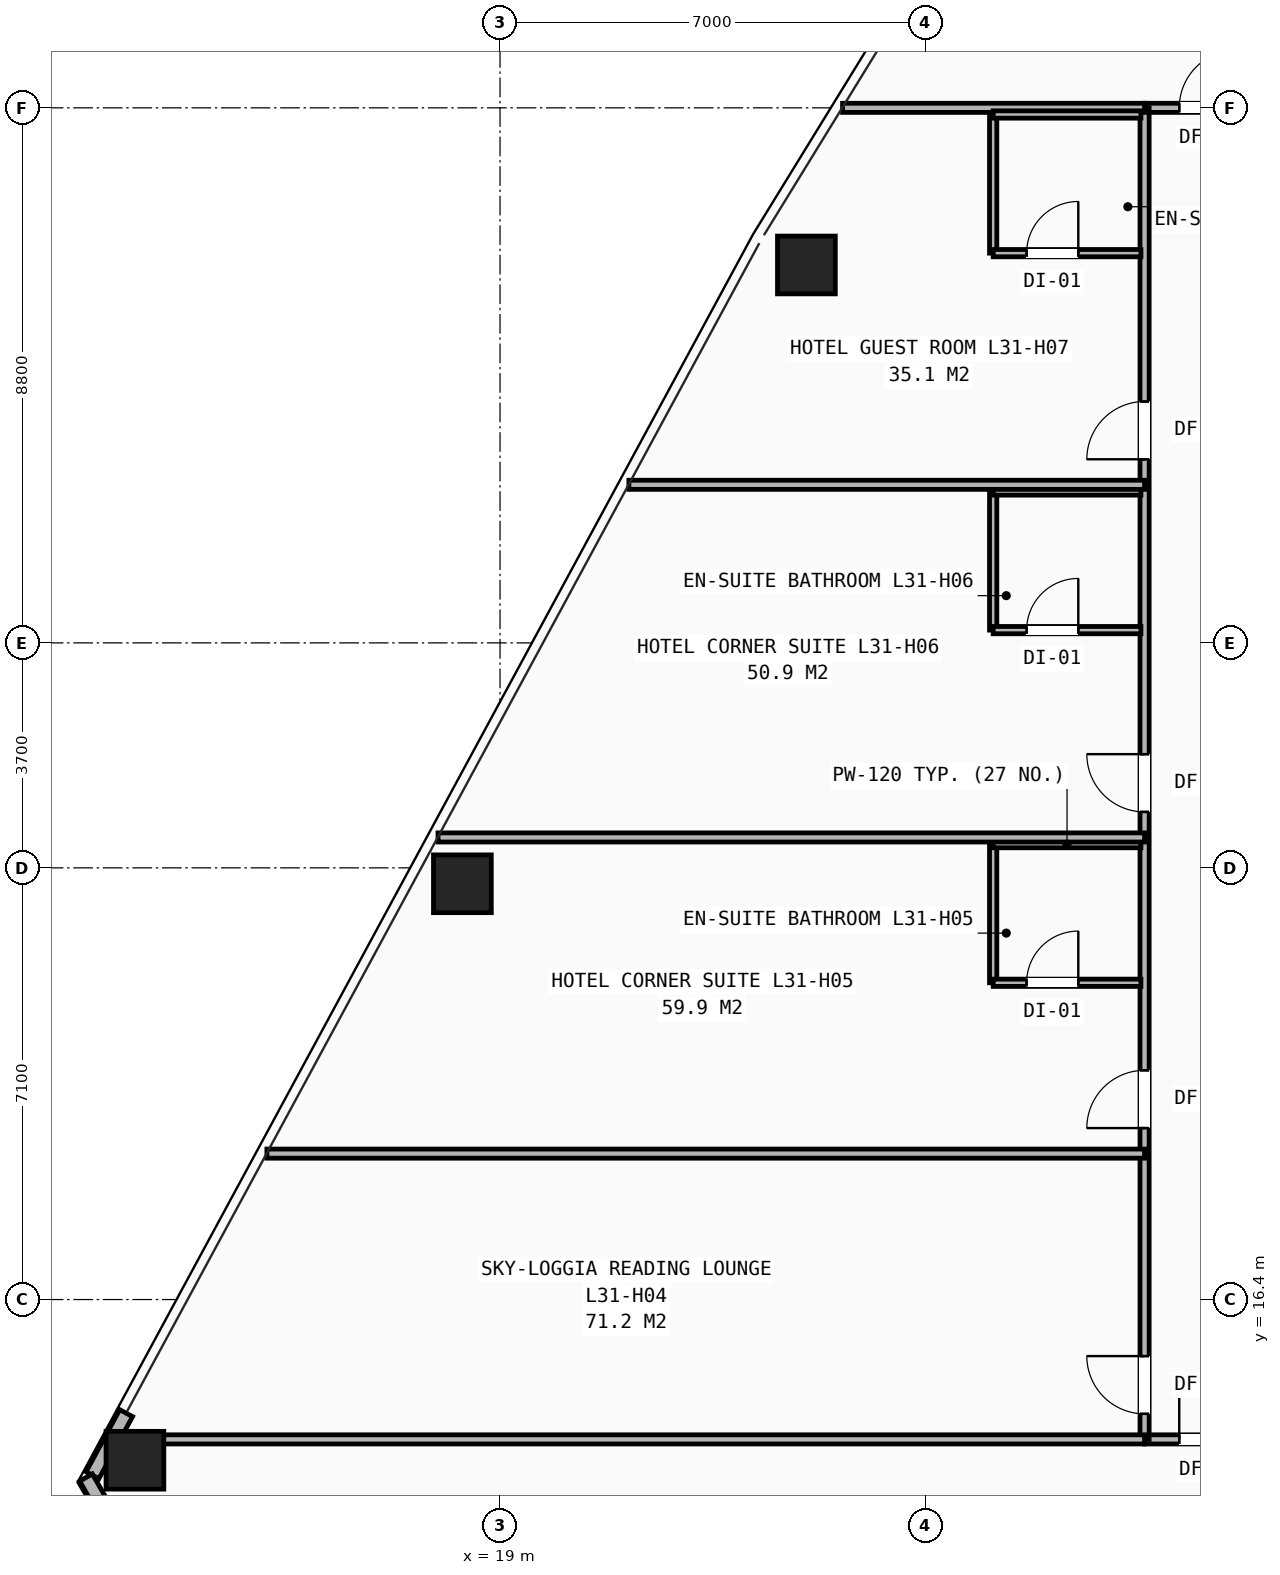
"""IFC4 building model, lengths in metres.
Left out: names, types, materials, properties, quantities, classifications, styles, units other than length and angle.
Written with IfcOpenShell. Run it as: python <this file> out.ifc"""

import sys

from ifc_helpers import new_model, si_unit, direction, frame, frame_2d, origin, origin_2d, place, context, subcontext, project, spatial, rectangle, hollow_rectangle, extrude, element, fill, save


model = new_model("IFC4")
c1 = context("Model", 3, precision=1e-05, world=origin(), true_north=direction((0.0, 1.0)))
c2 = subcontext(c1, "Body", "Model", "MODEL_VIEW")
j1 = project(units=[si_unit("LENGTHUNIT", "METRE"), si_unit("PLANEANGLEUNIT", "RADIAN")], contexts=[c1])
p1 = place(None, origin())
s1 = spatial("IfcSite", under=j1, at=p1, CompositionType="ELEMENT")
p2 = place(p1, origin())
s2 = spatial("IfcBuilding", under=s1, at=p2, CompositionType="ELEMENT")
p3 = place(p2, frame((0.0, 0.0, 108.6)))
s3 = spatial("IfcBuildingStorey", under=s2, at=p3, CompositionType="ELEMENT", Elevation=108.6)
for number, where, z_axis, x_axis in (
    (1, (24.038, 33.416, 0.0), (0.0, 0.0, 1.0), (1.0, 0.0, 0.0)),
    (2, (18.381, 23.238, 0.0), (0.0, 0.0, 1.0), (1.0, 0.0, 0.0)),
    (3, (12.996, 13.757, 0.0), (0.0, 0.0, 1.0), (1.0, 0.0, 0.0)),
):
    element("IfcColumn", number, at=place(p3, frame(where, z_axis=z_axis, x_axis=x_axis)), inside=s3, PredefinedType="COLUMN", context=c2, shape_type="SweptSolid", body=[
        extrude(hollow_rectangle(XDim=0.95, YDim=0.95, WallThickness=0.065, at=origin_2d()), origin(), (0.0, 0.0, 1.0), 3.2),
    ])
p4 = place(p3, frame((12.85, 14.532, 0.0), z_axis=(0.0, 0.0, 1.0), x_axis=(-0.475877177097, -0.879511746549, 0.0)))
e4 = element("IfcWall", 4, at=p4, inside=s3, PredefinedType="SHEAR", context=c2, shape_type="SweptSolid", body=[
    extrude(rectangle(XDim=1.163, YDim=0.24, at=frame_2d((0.581, 0.0))), origin(), (0.0, 0.0, 1.0), 2.223),
])
p5 = place(p3, frame((16.805, 5.48, 0.0), z_axis=(0.0, 0.0, 1.0), x_axis=(-0.500017094579, 0.866015534, 0.0)))
e5 = element("IfcWall", 5, at=p5, inside=s3, PredefinedType="SHEAR", context=c2, shape_type="SweptSolid", body=[
    extrude(rectangle(XDim=9.229, YDim=0.24, at=frame_2d((4.614, 0.0))), origin(), (0.0, 0.0, 1.0), 2.223),
])
p6 = place(p3, frame((29.6, 14.1, 0.0), z_axis=(0.0, 0.0, 1.0), x_axis=(1.0, 0.0, 0.0)))
e6 = element("IfcWall", 6, at=p6, inside=s3, PredefinedType="PARTITIONING", context=c2, shape_type="SweptSolid", body=[
    extrude(rectangle(XDim=20.8, YDim=0.15, at=frame_2d((10.4, 0.0))), origin(), (0.0, 0.0, 1.0), 2.151),
])
p7 = place(p6, frame((0.57, 0.0, 0.0)))
e7 = element("IfcOpeningElement", 7, at=p7, cuts=e6, PredefinedType="OPENING", context=c2, shape_type="SweptSolid", body=[
    extrude(rectangle(XDim=0.95, YDim=2.1, at=frame_2d((0.475, 1.05))), frame((0.0, 0.085, 0.0), z_axis=(0.0, -1.0, 0.0), x_axis=(1.0, 0.0, 0.0)), (0.0, 0.0, 1.0), 0.17),
])
p8 = place(p6, frame((13.02, 0.0, 0.0)))
e8 = element("IfcOpeningElement", 8, at=p8, cuts=e6, PredefinedType="OPENING", context=c2, shape_type="SweptSolid", body=[
    extrude(rectangle(XDim=0.95, YDim=2.1, at=frame_2d((0.475, 1.05))), frame((0.0, 0.085, 0.0), z_axis=(0.0, -1.0, 0.0), x_axis=(1.0, 0.0, 0.0)), (0.0, 0.0, 1.0), 0.17),
])
p9 = place(p6, frame((17.42, 0.0, 0.0)))
e9 = element("IfcOpeningElement", 9, at=p9, cuts=e6, PredefinedType="OPENING", context=c2, shape_type="SweptSolid", body=[
    extrude(rectangle(XDim=0.95, YDim=2.1, at=frame_2d((0.475, 1.05))), frame((0.0, 0.085, 0.0), z_axis=(0.0, -1.0, 0.0), x_axis=(1.0, 0.0, 0.0)), (0.0, 0.0, 1.0), 0.17),
])
p10 = place(p3, frame((29.6, 36.0, 0.0), z_axis=(0.0, 0.0, 1.0), x_axis=(1.0, 0.0, 0.0)))
e10 = element("IfcWall", 10, at=p10, inside=s3, PredefinedType="PARTITIONING", context=c2, shape_type="SweptSolid", body=[
    extrude(rectangle(XDim=9.65, YDim=0.15, at=frame_2d((4.825, 0.0))), origin(), (0.0, 0.0, 1.0), 2.473),
])
p11 = place(p10, frame((0.57, 0.0, 0.0)))
e11 = element("IfcOpeningElement", 11, at=p11, cuts=e10, PredefinedType="OPENING", context=c2, shape_type="SweptSolid", body=[
    extrude(rectangle(XDim=0.95, YDim=2.1, at=frame_2d((0.475, 1.05))), frame((0.0, 0.085, 0.0), z_axis=(0.0, -1.0, 0.0), x_axis=(1.0, 0.0, 0.0)), (0.0, 0.0, 1.0), 0.17),
])
p12 = place(p10, frame((7.32, 0.0, 0.0)))
e12 = element("IfcOpeningElement", 12, at=p12, cuts=e10, PredefinedType="OPENING", context=c2, shape_type="SweptSolid", body=[
    extrude(rectangle(XDim=0.95, YDim=2.1, at=frame_2d((0.475, 1.05))), frame((0.0, 0.085, 0.0), z_axis=(0.0, -1.0, 0.0), x_axis=(1.0, 0.0, 0.0)), (0.0, 0.0, 1.0), 0.17),
])
p13 = place(p3, frame((29.6, 14.1, 0.0), z_axis=(0.0, 0.0, 1.0), x_axis=(0.0, 1.0, 0.0)))
e13 = element("IfcWall", 13, at=p13, inside=s3, PredefinedType="PARTITIONING", context=c2, shape_type="SweptSolid", body=[
    extrude(rectangle(XDim=21.9, YDim=0.15, at=frame_2d((10.95, 0.0))), origin(), (0.0, 0.0, 1.0), 2.151),
])
p14 = place(p13, frame((0.42, 0.0, 0.0)))
e14 = element("IfcOpeningElement", 14, at=p14, cuts=e13, PredefinedType="OPENING", context=c2, shape_type="SweptSolid", body=[
    extrude(rectangle(XDim=0.95, YDim=2.1, at=frame_2d((0.475, 1.05))), frame((0.0, 0.085, 0.0), z_axis=(0.0, -1.0, 0.0), x_axis=(1.0, 0.0, 0.0)), (0.0, 0.0, 1.0), 0.17),
])
p15 = place(p13, frame((5.12, 0.0, 0.0)))
e15 = element("IfcOpeningElement", 15, at=p15, cuts=e13, PredefinedType="OPENING", context=c2, shape_type="SweptSolid", body=[
    extrude(rectangle(XDim=0.95, YDim=2.1, at=frame_2d((0.475, 1.05))), frame((0.0, 0.085, 0.0), z_axis=(0.0, -1.0, 0.0), x_axis=(1.0, 0.0, 0.0)), (0.0, 0.0, 1.0), 0.17),
])
p16 = place(p13, frame((10.32, 0.0, 0.0)))
e16 = element("IfcOpeningElement", 16, at=p16, cuts=e13, PredefinedType="OPENING", context=c2, shape_type="SweptSolid", body=[
    extrude(rectangle(XDim=0.95, YDim=2.1, at=frame_2d((0.475, 1.05))), frame((0.0, 0.085, 0.0), z_axis=(0.0, -1.0, 0.0), x_axis=(1.0, 0.0, 0.0)), (0.0, 0.0, 1.0), 0.17),
])
p17 = place(p13, frame((16.12, 0.0, 0.0)))
e17 = element("IfcOpeningElement", 17, at=p17, cuts=e13, PredefinedType="OPENING", context=c2, shape_type="SweptSolid", body=[
    extrude(rectangle(XDim=0.95, YDim=2.1, at=frame_2d((0.475, 1.05))), frame((0.0, 0.085, 0.0), z_axis=(0.0, -1.0, 0.0), x_axis=(1.0, 0.0, 0.0)), (0.0, 0.0, 1.0), 0.17),
])
p18 = place(p3, frame((12.622, 14.1, 0.0), z_axis=(0.0, 0.0, 1.0), x_axis=(1.0, 0.0, 0.0)))
e18 = element("IfcWall", 18, at=p18, inside=s3, PredefinedType="PARTITIONING", context=c2, shape_type="SweptSolid", body=[
    extrude(rectangle(XDim=16.978, YDim=0.15, at=frame_2d((8.489, 0.0))), origin(), (0.0, 0.0, 1.0), 2.151),
])
p19 = place(p3, frame((24.633, 36.0, 0.0), z_axis=(0.0, 0.0, 1.0), x_axis=(1.0, 0.0, 0.0)))
e19 = element("IfcWall", 19, at=p19, inside=s3, PredefinedType="PARTITIONING", context=c2, shape_type="SweptSolid", body=[
    extrude(rectangle(XDim=4.967, YDim=0.15, at=frame_2d((2.483, 0.0))), origin(), (0.0, 0.0, 1.0), 2.228),
])
p20 = place(p3, frame((15.166, 18.8, 0.0), z_axis=(0.0, 0.0, 1.0), x_axis=(1.0, 0.0, 0.0)))
e20 = element("IfcWall", 20, at=p20, inside=s3, PredefinedType="PARTITIONING", context=c2, shape_type="SweptSolid", body=[
    extrude(rectangle(XDim=14.434, YDim=0.15, at=frame_2d((7.217, 0.0))), origin(), (0.0, 0.0, 1.0), 2.228),
])
p21 = place(p3, frame((27.11, 21.61, 0.0), z_axis=(0.0, 0.0, 1.0), x_axis=(0.0, 1.0, 0.0)))
e21 = element("IfcWall", 21, at=p21, inside=s3, PredefinedType="PARTITIONING", context=c2, shape_type="SweptSolid", body=[
    extrude(rectangle(XDim=2.28, YDim=0.12, at=frame_2d((1.14, 0.0))), origin(), (0.0, 0.0, 1.0), 2.94),
])
p22 = place(p3, frame((27.11, 21.61, 0.0), z_axis=(0.0, 0.0, 1.0), x_axis=(1.0, 0.0, 0.0)))
e22 = element("IfcWall", 22, at=p22, inside=s3, PredefinedType="PARTITIONING", context=c2, shape_type="SweptSolid", body=[
    extrude(rectangle(XDim=2.43, YDim=0.12, at=frame_2d((1.215, 0.0))), origin(), (0.0, 0.0, 1.0), 2.94),
])
p23 = place(p22, frame((0.55, 0.0, 0.0)))
e23 = element("IfcOpeningElement", 23, at=p23, cuts=e22, PredefinedType="OPENING", context=c2, shape_type="SweptSolid", body=[
    extrude(rectangle(XDim=0.85, YDim=2.05, at=frame_2d((0.425, 1.025))), frame((0.0, 0.07, 0.0), z_axis=(0.0, -1.0, 0.0), x_axis=(1.0, 0.0, 0.0)), (0.0, 0.0, 1.0), 0.14),
])
p24 = place(p3, frame((27.11, 23.89, 0.0), z_axis=(0.0, 0.0, 1.0), x_axis=(1.0, 0.0, 0.0)))
e24 = element("IfcWall", 24, at=p24, inside=s3, PredefinedType="PARTITIONING", context=c2, shape_type="SweptSolid", body=[
    extrude(rectangle(XDim=2.43, YDim=0.12, at=frame_2d((1.215, 0.0))), origin(), (0.0, 0.0, 1.0), 2.94),
])
p25 = place(p3, frame((17.98, 24.0, 0.0), z_axis=(0.0, 0.0, 1.0), x_axis=(1.0, 0.0, 0.0)))
e25 = element("IfcWall", 25, at=p25, inside=s3, PredefinedType="PARTITIONING", context=c2, shape_type="SweptSolid", body=[
    extrude(rectangle(XDim=11.62, YDim=0.15, at=frame_2d((5.81, 0.0))), origin(), (0.0, 0.0, 1.0), 2.228),
])
p26 = place(p3, frame((27.11, 27.41, 0.0), z_axis=(0.0, 0.0, 1.0), x_axis=(0.0, 1.0, 0.0)))
e26 = element("IfcWall", 26, at=p26, inside=s3, PredefinedType="PARTITIONING", context=c2, shape_type="SweptSolid", body=[
    extrude(rectangle(XDim=2.28, YDim=0.12, at=frame_2d((1.14, 0.0))), origin(), (0.0, 0.0, 1.0), 2.94),
])
p27 = place(p3, frame((27.11, 27.41, 0.0), z_axis=(0.0, 0.0, 1.0), x_axis=(1.0, 0.0, 0.0)))
e27 = element("IfcWall", 27, at=p27, inside=s3, PredefinedType="PARTITIONING", context=c2, shape_type="SweptSolid", body=[
    extrude(rectangle(XDim=2.43, YDim=0.12, at=frame_2d((1.215, 0.0))), origin(), (0.0, 0.0, 1.0), 2.94),
])
p28 = place(p27, frame((0.55, 0.0, 0.0)))
e28 = element("IfcOpeningElement", 28, at=p28, cuts=e27, PredefinedType="OPENING", context=c2, shape_type="SweptSolid", body=[
    extrude(rectangle(XDim=0.85, YDim=2.05, at=frame_2d((0.425, 1.025))), frame((0.0, 0.07, 0.0), z_axis=(0.0, -1.0, 0.0), x_axis=(1.0, 0.0, 0.0)), (0.0, 0.0, 1.0), 0.14),
])
p29 = place(p3, frame((27.11, 29.69, 0.0), z_axis=(0.0, 0.0, 1.0), x_axis=(1.0, 0.0, 0.0)))
e29 = element("IfcWall", 29, at=p29, inside=s3, PredefinedType="PARTITIONING", context=c2, shape_type="SweptSolid", body=[
    extrude(rectangle(XDim=2.43, YDim=0.12, at=frame_2d((1.215, 0.0))), origin(), (0.0, 0.0, 1.0), 2.94),
])
p30 = place(p3, frame((21.119, 29.8, 0.0), z_axis=(0.0, 0.0, 1.0), x_axis=(1.0, 0.0, 0.0)))
e30 = element("IfcWall", 30, at=p30, inside=s3, PredefinedType="PARTITIONING", context=c2, shape_type="SweptSolid", body=[
    extrude(rectangle(XDim=8.481, YDim=0.15, at=frame_2d((4.241, 0.0))), origin(), (0.0, 0.0, 1.0), 2.228),
])
p31 = place(p3, frame((27.11, 33.61, 0.0), z_axis=(0.0, 0.0, 1.0), x_axis=(0.0, 1.0, 0.0)))
e31 = element("IfcWall", 31, at=p31, inside=s3, PredefinedType="PARTITIONING", context=c2, shape_type="SweptSolid", body=[
    extrude(rectangle(XDim=2.28, YDim=0.12, at=frame_2d((1.14, 0.0))), origin(), (0.0, 0.0, 1.0), 2.94),
])
p32 = place(p3, frame((27.11, 33.61, 0.0), z_axis=(0.0, 0.0, 1.0), x_axis=(1.0, 0.0, 0.0)))
e32 = element("IfcWall", 32, at=p32, inside=s3, PredefinedType="PARTITIONING", context=c2, shape_type="SweptSolid", body=[
    extrude(rectangle(XDim=2.43, YDim=0.12, at=frame_2d((1.215, 0.0))), origin(), (0.0, 0.0, 1.0), 2.473),
])
p33 = place(p32, frame((0.55, 0.0, 0.0)))
e33 = element("IfcOpeningElement", 33, at=p33, cuts=e32, PredefinedType="OPENING", context=c2, shape_type="SweptSolid", body=[
    extrude(rectangle(XDim=0.85, YDim=2.05, at=frame_2d((0.425, 1.025))), frame((0.0, 0.07, 0.0), z_axis=(0.0, -1.0, 0.0), x_axis=(1.0, 0.0, 0.0)), (0.0, 0.0, 1.0), 0.14),
])
p34 = place(p3, frame((27.11, 35.89, 0.0), z_axis=(0.0, 0.0, 1.0), x_axis=(1.0, 0.0, 0.0)))
e34 = element("IfcWall", 34, at=p34, inside=s3, PredefinedType="PARTITIONING", context=c2, shape_type="SweptSolid", body=[
    extrude(rectangle(XDim=2.43, YDim=0.12, at=frame_2d((1.215, 0.0))), origin(), (0.0, 0.0, 1.0), 2.473),
])
p35 = place(p7, origin())
e35 = element("IfcDoor", 35, at=p35, inside=s3, OperationType="SINGLE_SWING_LEFT", PredefinedType="DOOR", context=c2, shape_type="SweptSolid", body=[
    extrude(rectangle(XDim=0.95, YDim=2.1, at=frame_2d((0.475, 1.05))), frame((0.0, 0.025, 0.0), z_axis=(0.0, -1.0, 0.0), x_axis=(1.0, 0.0, 0.0)), (0.0, 0.0, 1.0), 0.05),
])
fill(e7, e35)
p36 = place(p14, origin())
e36 = element("IfcDoor", 36, at=p36, inside=s3, OperationType="SINGLE_SWING_RIGHT", PredefinedType="DOOR", context=c2, shape_type="SweptSolid", body=[
    extrude(rectangle(XDim=0.95, YDim=2.1, at=frame_2d((0.475, 1.05))), frame((0.0, 0.025, 0.0), z_axis=(0.0, -1.0, 0.0), x_axis=(1.0, 0.0, 0.0)), (0.0, 0.0, 1.0), 0.05),
])
fill(e14, e36)
p37 = place(p15, origin())
e37 = element("IfcDoor", 37, at=p37, inside=s3, OperationType="SINGLE_SWING_LEFT", PredefinedType="DOOR", context=c2, shape_type="SweptSolid", body=[
    extrude(rectangle(XDim=0.95, YDim=2.1, at=frame_2d((0.475, 1.05))), frame((0.0, 0.025, 0.0), z_axis=(0.0, -1.0, 0.0), x_axis=(1.0, 0.0, 0.0)), (0.0, 0.0, 1.0), 0.05),
])
fill(e15, e37)
p38 = place(p23, origin())
e38 = element("IfcDoor", 38, at=p38, inside=s3, OperationType="SINGLE_SWING_RIGHT", PredefinedType="DOOR", context=c2, shape_type="SweptSolid", body=[
    extrude(rectangle(XDim=0.85, YDim=2.05, at=frame_2d((0.425, 1.025))), frame((0.0, 0.025, 0.0), z_axis=(0.0, -1.0, 0.0), x_axis=(1.0, 0.0, 0.0)), (0.0, 0.0, 1.0), 0.05),
])
fill(e23, e38)
p39 = place(p16, origin())
e39 = element("IfcDoor", 39, at=p39, inside=s3, OperationType="SINGLE_SWING_RIGHT", PredefinedType="DOOR", context=c2, shape_type="SweptSolid", body=[
    extrude(rectangle(XDim=0.95, YDim=2.1, at=frame_2d((0.475, 1.05))), frame((0.0, 0.025, 0.0), z_axis=(0.0, -1.0, 0.0), x_axis=(1.0, 0.0, 0.0)), (0.0, 0.0, 1.0), 0.05),
])
fill(e16, e39)
p40 = place(p28, origin())
e40 = element("IfcDoor", 40, at=p40, inside=s3, OperationType="SINGLE_SWING_RIGHT", PredefinedType="DOOR", context=c2, shape_type="SweptSolid", body=[
    extrude(rectangle(XDim=0.85, YDim=2.05, at=frame_2d((0.425, 1.025))), frame((0.0, 0.025, 0.0), z_axis=(0.0, -1.0, 0.0), x_axis=(1.0, 0.0, 0.0)), (0.0, 0.0, 1.0), 0.05),
])
fill(e28, e40)
p41 = place(p17, origin())
e41 = element("IfcDoor", 41, at=p41, inside=s3, OperationType="SINGLE_SWING_LEFT", PredefinedType="DOOR", context=c2, shape_type="SweptSolid", body=[
    extrude(rectangle(XDim=0.95, YDim=2.1, at=frame_2d((0.475, 1.05))), frame((0.0, 0.025, 0.0), z_axis=(0.0, -1.0, 0.0), x_axis=(1.0, 0.0, 0.0)), (0.0, 0.0, 1.0), 0.05),
])
fill(e17, e41)
p42 = place(p33, origin())
e42 = element("IfcDoor", 42, at=p42, inside=s3, OperationType="SINGLE_SWING_RIGHT", PredefinedType="DOOR", context=c2, shape_type="SweptSolid", body=[
    extrude(rectangle(XDim=0.85, YDim=2.05, at=frame_2d((0.425, 1.025))), frame((0.0, 0.025, 0.0), z_axis=(0.0, -1.0, 0.0), x_axis=(1.0, 0.0, 0.0)), (0.0, 0.0, 1.0), 0.05),
])
fill(e33, e42)
p43 = place(p11, origin())
e43 = element("IfcDoor", 43, at=p43, inside=s3, OperationType="SINGLE_SWING_RIGHT", PredefinedType="DOOR", context=c2, shape_type="SweptSolid", body=[
    extrude(rectangle(XDim=0.95, YDim=2.1, at=frame_2d((0.475, 1.05))), frame((0.0, 0.025, 0.0), z_axis=(0.0, -1.0, 0.0), x_axis=(1.0, 0.0, 0.0)), (0.0, 0.0, 1.0), 0.05),
])
fill(e11, e43)
save(model, sys.argv[1])
